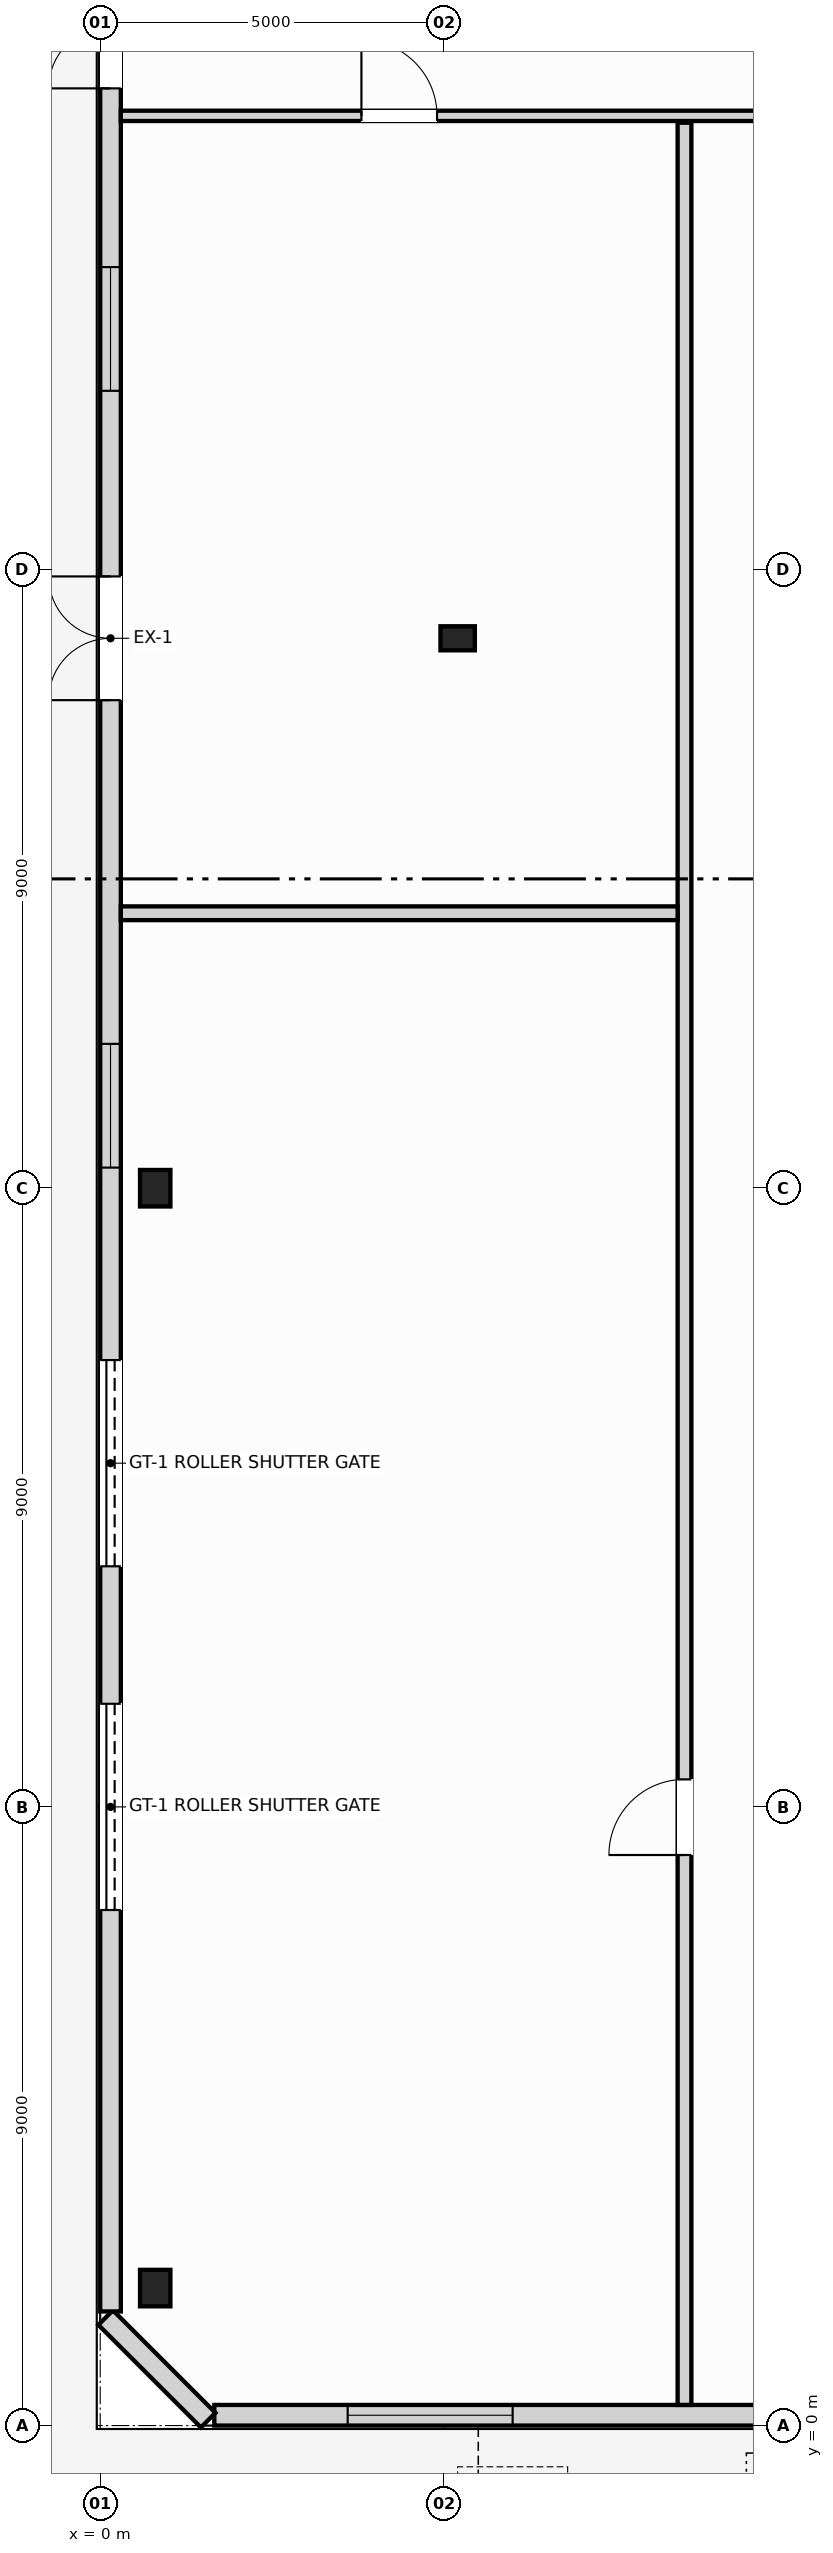
"""IFC4 building model, lengths in metres.
Left out: names, types, materials, properties, quantities, classifications, styles, units other than length and angle.
Written with IfcOpenShell. Run it as: python <this file> out.ifc"""

import sys

from ifc_helpers import new_model, si_unit, direction, frame, frame_2d, origin, origin_2d, place, context, subcontext, project, spatial, rectangle, i_section, extrude, source, transform, mapped, element, fill, save


model = new_model("IFC4")
c1 = context("Model", 3, precision=1e-05, world=origin(), true_north=direction((0.0, 1.0)))
c2 = subcontext(c1, "Body", "Model", "MODEL_VIEW")
j1 = project(units=[si_unit("LENGTHUNIT", "METRE"), si_unit("PLANEANGLEUNIT", "RADIAN")], contexts=[c1])
p1 = place(None, origin())
s1 = spatial("IfcSite", under=j1, at=p1, CompositionType="ELEMENT")
p2 = place(p1, origin())
s2 = spatial("IfcBuilding", under=s1, at=p2, CompositionType="ELEMENT")
p3 = place(p2, origin())
s3 = spatial("IfcBuildingStorey", under=s2, at=p3, CompositionType="ELEMENT", Elevation=0.0)
m1 = source(origin(), c2, "Body", "SweptSolid", [
    extrude(i_section(OverallWidth=0.442, OverallDepth=0.531, WebThickness=0.065, FlangeThickness=0.076, FilletRadius=0.015, at=origin_2d()), origin(), (0.0, 0.0, 1.0), 5.6),
])
for number, where, z_axis, x_axis in (
    (1, (0.8, 2.0, 0.0), (0.0, 0.0, 1.0), (1.0, 0.0, 0.0)),
    (2, (0.8, 18.0, 0.0), (0.0, 0.0, 1.0), (1.0, 0.0, 0.0)),
):
    element("IfcColumn", number, at=place(p3, frame(where, z_axis=z_axis, x_axis=x_axis)), inside=s3, PredefinedType="COLUMN", context=c2, shape_type="MappedRepresentation", body=[
        mapped(m1, transform((0.0, 0.0, 0.0), scale=1.0)),
    ])
m2 = source(origin(), c2, "Body", "SweptSolid", [
    extrude(rectangle(XDim=0.5, YDim=0.35, at=origin_2d()), origin(), (0.0, 0.0, 1.0), 5.32),
])
p4 = place(p3, frame((5.2, 26.0, 0.0), z_axis=(0.0, 0.0, 1.0), x_axis=(1.0, 0.0, 0.0)))
e3 = element("IfcColumn", 3, at=p4, inside=s3, PredefinedType="PILASTER", context=c2, shape_type="MappedRepresentation", body=[
    mapped(m2, transform((0.0, 0.0, 0.0), scale=1.0)),
])
p5 = place(p3, frame((66.34, 0.15, 0.0), z_axis=(0.0, 0.0, 1.0), x_axis=(-1.0, 0.0, 0.0)))
e4 = element("IfcWall", 4, at=p5, inside=s3, PredefinedType="STANDARD", context=c2, shape_type="SweptSolid", body=[
    extrude(rectangle(XDim=64.68, YDim=0.3, at=frame_2d((32.34, 0.0))), origin(), (0.0, 0.0, 1.0), 5.32),
])
p6 = place(p5, frame((54.64, 0.0, 0.0)))
e5 = element("IfcOpeningElement", 5, at=p6, cuts=e4, PredefinedType="OPENING", context=c2, shape_type="SweptSolid", body=[
    extrude(rectangle(XDim=1.8, YDim=2.4, at=frame_2d((0.9, 1.2))), frame((0.0, 0.16, 0.0), z_axis=(0.0, -1.0, 0.0), x_axis=(1.0, 0.0, 0.0)), (0.0, 0.0, 1.0), 0.32),
])
p7 = place(p5, frame((50.24, 0.0, 0.0)))
e6 = element("IfcOpeningElement", 6, at=p7, cuts=e4, PredefinedType="OPENING", context=c2, shape_type="SweptSolid", body=[
    extrude(rectangle(XDim=1.8, YDim=2.4, at=frame_2d((0.9, 1.2))), frame((0.0, 0.16, 0.0), z_axis=(0.0, -1.0, 0.0), x_axis=(1.0, 0.0, 0.0)), (0.0, 0.0, 1.0), 0.32),
])
p8 = place(p5, frame((39.44, 0.0, 0.0)))
e7 = element("IfcOpeningElement", 7, at=p8, cuts=e4, PredefinedType="OPENING", context=c2, shape_type="SweptSolid", body=[
    extrude(rectangle(XDim=1.8, YDim=2.4, at=frame_2d((0.9, 1.2))), frame((0.0, 0.16, 0.0), z_axis=(0.0, -1.0, 0.0), x_axis=(1.0, 0.0, 0.0)), (0.0, 0.0, 1.0), 0.32),
])
p9 = place(p5, frame((31.44, 0.0, 0.0)))
e8 = element("IfcOpeningElement", 8, at=p9, cuts=e4, PredefinedType="OPENING", context=c2, shape_type="SweptSolid", body=[
    extrude(rectangle(XDim=1.8, YDim=2.4, at=frame_2d((0.9, 1.2))), frame((0.0, 0.16, 0.0), z_axis=(0.0, -1.0, 0.0), x_axis=(1.0, 0.0, 0.0)), (0.0, 0.0, 1.0), 0.32),
])
p10 = place(p5, frame((23.44, 0.0, 0.0)))
e9 = element("IfcOpeningElement", 9, at=p10, cuts=e4, PredefinedType="OPENING", context=c2, shape_type="SweptSolid", body=[
    extrude(rectangle(XDim=1.8, YDim=2.4, at=frame_2d((0.9, 1.2))), frame((0.0, 0.16, 0.0), z_axis=(0.0, -1.0, 0.0), x_axis=(1.0, 0.0, 0.0)), (0.0, 0.0, 1.0), 0.32),
])
p11 = place(p5, frame((12.44, 0.0, 0.0)))
e10 = element("IfcOpeningElement", 10, at=p11, cuts=e4, PredefinedType="OPENING", context=c2, shape_type="SweptSolid", body=[
    extrude(rectangle(XDim=1.8, YDim=2.4, at=frame_2d((0.9, 1.2))), frame((0.0, 0.16, 0.0), z_axis=(0.0, -1.0, 0.0), x_axis=(1.0, 0.0, 0.0)), (0.0, 0.0, 1.0), 0.32),
])
p12 = place(p5, frame((8.24, 0.0, 0.0)))
e11 = element("IfcOpeningElement", 11, at=p12, cuts=e4, PredefinedType="OPENING", context=c2, shape_type="SweptSolid", body=[
    extrude(rectangle(XDim=1.8, YDim=2.4, at=frame_2d((0.9, 1.2))), frame((0.0, 0.16, 0.0), z_axis=(0.0, -1.0, 0.0), x_axis=(1.0, 0.0, 0.0)), (0.0, 0.0, 1.0), 0.32),
])
p13 = place(p5, frame((1.64, 0.0, 0.0)))
e12 = element("IfcOpeningElement", 12, at=p13, cuts=e4, PredefinedType="OPENING", context=c2, shape_type="SweptSolid", body=[
    extrude(rectangle(XDim=1.8, YDim=2.4, at=frame_2d((0.9, 1.2))), frame((0.0, 0.16, 0.0), z_axis=(0.0, -1.0, 0.0), x_axis=(1.0, 0.0, 0.0)), (0.0, 0.0, 1.0), 0.32),
])
p14 = place(p5, frame((60.34, 0.0, 1.1)))
e13 = element("IfcOpeningElement", 13, at=p14, cuts=e4, PredefinedType="OPENING", context=c2, shape_type="SweptSolid", body=[
    extrude(rectangle(XDim=2.4, YDim=2.2, at=frame_2d((1.2, 1.1))), frame((0.0, 0.16, 0.0), z_axis=(0.0, -1.0, 0.0), x_axis=(1.0, 0.0, 0.0)), (0.0, 0.0, 1.0), 0.32),
])
p15 = place(p5, frame((34.94, 0.0, 1.1)))
e14 = element("IfcOpeningElement", 14, at=p15, cuts=e4, PredefinedType="OPENING", context=c2, shape_type="SweptSolid", body=[
    extrude(rectangle(XDim=2.4, YDim=2.2, at=frame_2d((1.2, 1.1))), frame((0.0, 0.16, 0.0), z_axis=(0.0, -1.0, 0.0), x_axis=(1.0, 0.0, 0.0)), (0.0, 0.0, 1.0), 0.32),
])
p16 = place(p5, frame((27.34, 0.0, 1.1)))
e15 = element("IfcOpeningElement", 15, at=p16, cuts=e4, PredefinedType="OPENING", context=c2, shape_type="SweptSolid", body=[
    extrude(rectangle(XDim=2.4, YDim=2.2, at=frame_2d((1.2, 1.1))), frame((0.0, 0.16, 0.0), z_axis=(0.0, -1.0, 0.0), x_axis=(1.0, 0.0, 0.0)), (0.0, 0.0, 1.0), 0.32),
])
p17 = place(p5, frame((4.74, 0.0, 1.1)))
e16 = element("IfcOpeningElement", 16, at=p17, cuts=e4, PredefinedType="OPENING", context=c2, shape_type="SweptSolid", body=[
    extrude(rectangle(XDim=2.4, YDim=2.2, at=frame_2d((1.2, 1.1))), frame((0.0, 0.16, 0.0), z_axis=(0.0, -1.0, 0.0), x_axis=(1.0, 0.0, 0.0)), (0.0, 0.0, 1.0), 0.32),
])
p18 = place(p3, frame((1.571, 0.079, 0.0), z_axis=(0.0, 0.0, 1.0), x_axis=(-0.707106781187, 0.707106781187, 0.0)))
e17 = element("IfcWall", 17, at=p18, inside=s3, PredefinedType="STANDARD", context=c2, shape_type="SweptSolid", body=[
    extrude(rectangle(XDim=2.109, YDim=0.3, at=frame_2d((1.055, 0.0))), origin(), (0.0, 0.0, 1.0), 5.32),
])
p19 = place(p3, frame((0.15, 1.66, 0.0), z_axis=(0.0, 0.0, 1.0), x_axis=(0.0, 1.0, 0.0)))
e18 = element("IfcWall", 18, at=p19, inside=s3, PredefinedType="STANDARD", context=c2, shape_type="SweptSolid", body=[
    extrude(rectangle(XDim=48.68, YDim=0.3, at=frame_2d((24.34, 0.0))), origin(), (0.0, 0.0, 1.0), 5.32),
])
p20 = place(p19, frame((23.44, 0.0, 0.0)))
e19 = element("IfcOpeningElement", 19, at=p20, cuts=e18, PredefinedType="OPENING", context=c2, shape_type="SweptSolid", body=[
    extrude(rectangle(XDim=1.8, YDim=2.4, at=frame_2d((0.9, 1.2))), frame((0.0, 0.16, 0.0), z_axis=(0.0, -1.0, 0.0), x_axis=(1.0, 0.0, 0.0)), (0.0, 0.0, 1.0), 0.32),
])
p21 = place(p19, frame((32.34, 0.0, 0.0)))
e20 = element("IfcOpeningElement", 20, at=p21, cuts=e18, PredefinedType="OPENING", context=c2, shape_type="SweptSolid", body=[
    extrude(rectangle(XDim=1.8, YDim=2.4, at=frame_2d((0.9, 1.2))), frame((0.0, 0.16, 0.0), z_axis=(0.0, -1.0, 0.0), x_axis=(1.0, 0.0, 0.0)), (0.0, 0.0, 1.0), 0.32),
])
p22 = place(p19, frame((5.84, 0.0, 0.0)))
e21 = element("IfcOpeningElement", 21, at=p22, cuts=e18, PredefinedType="OPENING", context=c2, shape_type="SweptSolid", body=[
    extrude(rectangle(XDim=3.0, YDim=2.8, at=frame_2d((1.5, 1.4))), frame((0.0, 0.16, 0.0), z_axis=(0.0, -1.0, 0.0), x_axis=(1.0, 0.0, 0.0)), (0.0, 0.0, 1.0), 0.32),
])
p23 = place(p19, frame((10.84, 0.0, 0.0)))
e22 = element("IfcOpeningElement", 22, at=p23, cuts=e18, PredefinedType="OPENING", context=c2, shape_type="SweptSolid", body=[
    extrude(rectangle(XDim=3.0, YDim=2.8, at=frame_2d((1.5, 1.4))), frame((0.0, 0.16, 0.0), z_axis=(0.0, -1.0, 0.0), x_axis=(1.0, 0.0, 0.0)), (0.0, 0.0, 1.0), 0.32),
])
p24 = place(p19, frame((16.64, 0.0, 1.1)))
e23 = element("IfcOpeningElement", 23, at=p24, cuts=e18, PredefinedType="OPENING", context=c2, shape_type="SweptSolid", body=[
    extrude(rectangle(XDim=1.8, YDim=2.0, at=frame_2d((0.9, 1.0))), frame((0.0, 0.16, 0.0), z_axis=(0.0, -1.0, 0.0), x_axis=(1.0, 0.0, 0.0)), (0.0, 0.0, 1.0), 0.32),
])
p25 = place(p19, frame((27.94, 0.0, 1.1)))
e24 = element("IfcOpeningElement", 24, at=p25, cuts=e18, PredefinedType="OPENING", context=c2, shape_type="SweptSolid", body=[
    extrude(rectangle(XDim=1.8, YDim=2.0, at=frame_2d((0.9, 1.0))), frame((0.0, 0.16, 0.0), z_axis=(0.0, -1.0, 0.0), x_axis=(1.0, 0.0, 0.0)), (0.0, 0.0, 1.0), 0.32),
])
p26 = place(p19, frame((39.44, 0.0, 1.1)))
e25 = element("IfcOpeningElement", 25, at=p26, cuts=e18, PredefinedType="OPENING", context=c2, shape_type="SweptSolid", body=[
    extrude(rectangle(XDim=1.8, YDim=2.0, at=frame_2d((0.9, 1.0))), frame((0.0, 0.16, 0.0), z_axis=(0.0, -1.0, 0.0), x_axis=(1.0, 0.0, 0.0)), (0.0, 0.0, 1.0), 0.32),
])
p27 = place(p3, frame((0.3, 33.6, 0.0), z_axis=(0.0, 0.0, 1.0), x_axis=(1.0, 0.0, 0.0)))
e26 = element("IfcWall", 26, at=p27, inside=s3, PredefinedType="PARTITIONING", context=c2, shape_type="SweptSolid", body=[
    extrude(rectangle(XDim=59.3, YDim=0.15, at=frame_2d((29.65, 0.0))), origin(), (0.0, 0.0, 1.0), 5.32),
])
p28 = place(p27, frame((3.5, 0.0, 0.0)))
e27 = element("IfcOpeningElement", 27, at=p28, cuts=e26, PredefinedType="OPENING", context=c2, shape_type="SweptSolid", body=[
    extrude(rectangle(XDim=1.1, YDim=2.15, at=frame_2d((0.55, 1.075))), frame((0.0, 0.085, 0.0), z_axis=(0.0, -1.0, 0.0), x_axis=(1.0, 0.0, 0.0)), (0.0, 0.0, 1.0), 0.17),
])
p29 = place(p27, frame((14.0, 0.0, 0.0)))
e28 = element("IfcOpeningElement", 28, at=p29, cuts=e26, PredefinedType="OPENING", context=c2, shape_type="SweptSolid", body=[
    extrude(rectangle(XDim=1.8, YDim=2.25, at=frame_2d((0.9, 1.125))), frame((0.0, 0.085, 0.0), z_axis=(0.0, -1.0, 0.0), x_axis=(1.0, 0.0, 0.0)), (0.0, 0.0, 1.0), 0.17),
])
p30 = place(p27, frame((32.5, 0.0, 0.0)))
e29 = element("IfcOpeningElement", 29, at=p30, cuts=e26, PredefinedType="OPENING", context=c2, shape_type="SweptSolid", body=[
    extrude(rectangle(XDim=1.8, YDim=2.25, at=frame_2d((0.9, 1.125))), frame((0.0, 0.085, 0.0), z_axis=(0.0, -1.0, 0.0), x_axis=(1.0, 0.0, 0.0)), (0.0, 0.0, 1.0), 0.17),
])
p31 = place(p27, frame((51.5, 0.0, 0.0)))
e30 = element("IfcOpeningElement", 30, at=p31, cuts=e26, PredefinedType="OPENING", context=c2, shape_type="SweptSolid", body=[
    extrude(rectangle(XDim=1.8, YDim=2.25, at=frame_2d((0.9, 1.125))), frame((0.0, 0.085, 0.0), z_axis=(0.0, -1.0, 0.0), x_axis=(1.0, 0.0, 0.0)), (0.0, 0.0, 1.0), 0.17),
])
p32 = place(p3, frame((8.5, 0.3, 0.0), z_axis=(0.0, 0.0, 1.0), x_axis=(0.0, 1.0, 0.0)))
e31 = element("IfcWall", 31, at=p32, inside=s3, PredefinedType="SOLIDWALL", context=c2, shape_type="SweptSolid", body=[
    extrude(rectangle(XDim=33.2, YDim=0.2, at=frame_2d((16.6, 0.0))), origin(), (0.0, 0.0, 1.0), 4.4),
])
p33 = place(p32, frame((8.0, 0.0, 0.0)))
e32 = element("IfcOpeningElement", 32, at=p33, cuts=e31, PredefinedType="OPENING", context=c2, shape_type="SweptSolid", body=[
    extrude(rectangle(XDim=1.1, YDim=2.15, at=frame_2d((0.55, 1.075))), frame((0.0, 0.11, 0.0), z_axis=(0.0, -1.0, 0.0), x_axis=(1.0, 0.0, 0.0)), (0.0, 0.0, 1.0), 0.22),
])
p34 = place(p3, frame((0.3, 22.0, 0.0), z_axis=(0.0, 0.0, 1.0), x_axis=(1.0, 0.0, 0.0)))
e33 = element("IfcWall", 33, at=p34, inside=s3, PredefinedType="SOLIDWALL", context=c2, shape_type="SweptSolid", body=[
    extrude(rectangle(XDim=8.1, YDim=0.2, at=frame_2d((4.05, 0.0))), origin(), (0.0, 0.0, 1.0), 5.32),
])
m3 = source(origin(), c2, "Body", "SweptSolid", [
    extrude(rectangle(XDim=1.8, YDim=2.4, at=frame_2d((0.9, 1.2))), frame((0.0, 0.025, 0.0), z_axis=(0.0, -1.0, 0.0), x_axis=(1.0, 0.0, 0.0)), (0.0, 0.0, 1.0), 0.05),
])
p35 = place(p20, origin())
e34 = element("IfcDoor", 34, at=p35, inside=s3, OperationType="DOUBLE_DOOR_SINGLE_SWING", PredefinedType="DOOR", context=c2, shape_type="MappedRepresentation", body=[
    mapped(m3, transform((0.0, 0.0, 0.0), scale=1.0)),
])
fill(e19, e34)
p36 = place(p21, origin())
e35 = element("IfcDoor", 35, at=p36, inside=s3, OperationType="DOUBLE_DOOR_SINGLE_SWING", PredefinedType="DOOR", context=c2, shape_type="MappedRepresentation", body=[
    mapped(m3, transform((0.0, 0.0, 0.0), scale=1.0)),
])
fill(e20, e35)
m4 = source(origin(), c2, "Body", "SweptSolid", [
    extrude(rectangle(XDim=3.0, YDim=2.8, at=frame_2d((1.5, 1.4))), frame((0.0, 0.025, 0.0), z_axis=(0.0, -1.0, 0.0), x_axis=(1.0, 0.0, 0.0)), (0.0, 0.0, 1.0), 0.05),
])
p37 = place(p22, origin())
e36 = element("IfcDoor", 36, at=p37, inside=s3, OperationType="ROLLINGUP", PredefinedType="GATE", context=c2, shape_type="MappedRepresentation", body=[
    mapped(m4, transform((0.0, 0.0, 0.0), scale=1.0)),
])
fill(e21, e36)
p38 = place(p23, origin())
e37 = element("IfcDoor", 37, at=p38, inside=s3, OperationType="ROLLINGUP", PredefinedType="GATE", context=c2, shape_type="MappedRepresentation", body=[
    mapped(m4, transform((0.0, 0.0, 0.0), scale=1.0)),
])
fill(e22, e37)
m5 = source(origin(), c2, "Body", "SweptSolid", [
    extrude(rectangle(XDim=2.4, YDim=2.2, at=frame_2d((1.2, 1.1))), frame((0.0, 0.03, 0.0), z_axis=(0.0, -1.0, 0.0), x_axis=(1.0, 0.0, 0.0)), (0.0, 0.0, 1.0), 0.06),
])
p39 = place(p14, origin())
e38 = element("IfcWindow", 38, at=p39, inside=s3, PartitioningType="SINGLE_PANEL", PredefinedType="WINDOW", context=c2, shape_type="MappedRepresentation", body=[
    mapped(m5, transform((0.0, 0.0, 0.0), scale=1.0)),
])
fill(e13, e38)
m6 = source(origin(), c2, "Body", "SweptSolid", [
    extrude(rectangle(XDim=1.8, YDim=2.0, at=frame_2d((0.9, 1.0))), frame((0.0, 0.03, 0.0), z_axis=(0.0, -1.0, 0.0), x_axis=(1.0, 0.0, 0.0)), (0.0, 0.0, 1.0), 0.06),
])
p40 = place(p24, origin())
e39 = element("IfcWindow", 39, at=p40, inside=s3, PartitioningType="SINGLE_PANEL", PredefinedType="WINDOW", context=c2, shape_type="MappedRepresentation", body=[
    mapped(m6, transform((0.0, 0.0, 0.0), scale=1.0)),
])
fill(e23, e39)
p41 = place(p25, origin())
e40 = element("IfcWindow", 40, at=p41, inside=s3, PartitioningType="SINGLE_PANEL", PredefinedType="WINDOW", context=c2, shape_type="MappedRepresentation", body=[
    mapped(m6, transform((0.0, 0.0, 0.0), scale=1.0)),
])
fill(e24, e40)
p42 = place(p3, frame((0.0, 0.0, 4.8)))
p43 = place(p42, frame((10.5, -1.0, 0.0)))
p44 = place(p43, frame((0.0, 0.0, 0.17)))
e41 = element("IfcWindow", 41, at=p44, inside=s3, PartitioningType="SINGLE_PANEL", PredefinedType="SKYLIGHT", context=c2, shape_type="SweptSolid", body=[
    extrude(rectangle(XDim=2.2, YDim=1.2, at=origin_2d()), origin(), (0.0, 0.0, 1.0), 0.05),
])
m7 = source(origin(), c2, "Body", "SweptSolid", [
    extrude(rectangle(XDim=1.1, YDim=2.15, at=frame_2d((0.55, 1.075))), frame((0.0, 0.025, 0.0), z_axis=(0.0, -1.0, 0.0), x_axis=(1.0, 0.0, 0.0)), (0.0, 0.0, 1.0), 0.05),
])
p45 = place(p28, origin())
e42 = element("IfcDoor", 42, at=p45, inside=s3, OperationType="SINGLE_SWING_LEFT", PredefinedType="DOOR", context=c2, shape_type="MappedRepresentation", body=[
    mapped(m7, transform((0.0, 0.0, 0.0), scale=1.0)),
])
fill(e27, e42)
p46 = place(p33, origin())
e43 = element("IfcDoor", 43, at=p46, inside=s3, OperationType="SINGLE_SWING_RIGHT", PredefinedType="DOOR", context=c2, shape_type="MappedRepresentation", body=[
    mapped(m7, transform((0.0, 0.0, 0.0), scale=1.0)),
])
fill(e32, e43)
save(model, sys.argv[1])
